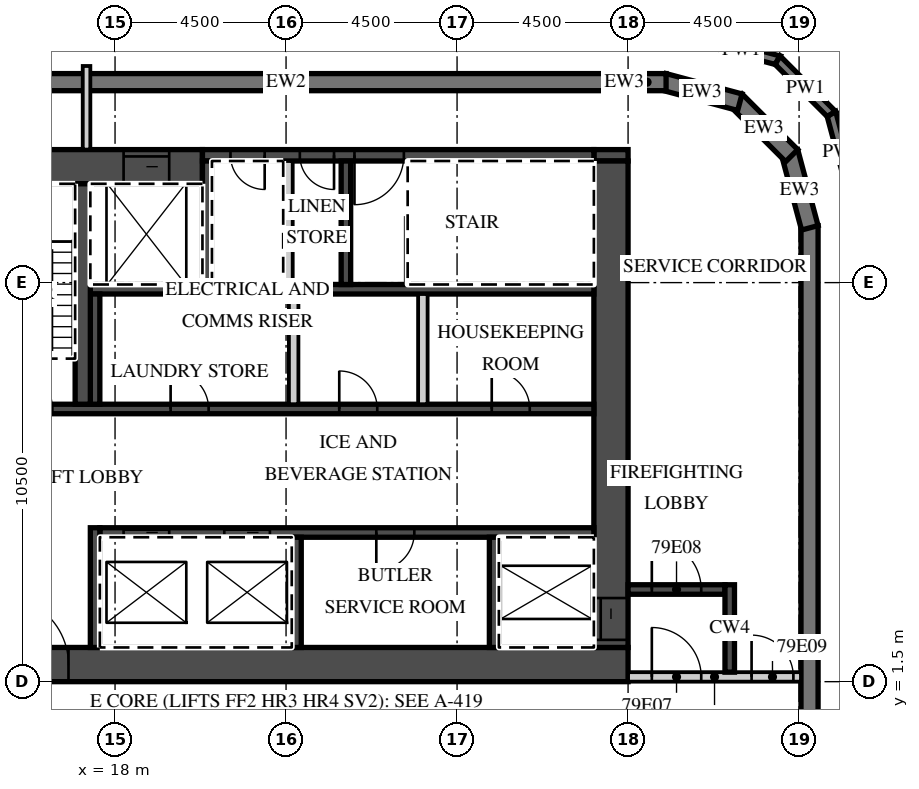
"""IFC4 building model, lengths in metres.
Left out: names, types, materials, properties, quantities, classifications, styles, units other than length and angle.
Written with IfcOpenShell. Run it as: python <this file> out.ifc"""

import sys

from ifc_helpers import new_model, si_unit, direction, frame, frame_2d, origin, place, context, subcontext, project, spatial, polyline, rectangle, outline, extrude, element, fill, save


model = new_model("IFC4")
c1 = context("Model", 3, precision=1e-05, world=origin(), true_north=direction((0.0, 1.0)))
c2 = subcontext(c1, "Body", "Model", "MODEL_VIEW")
j1 = project(units=[si_unit("LENGTHUNIT", "METRE"), si_unit("PLANEANGLEUNIT", "RADIAN")], contexts=[c1])
p1 = place(None, origin())
s1 = spatial("IfcSite", under=j1, at=p1, CompositionType="ELEMENT")
p2 = place(p1, origin())
s2 = spatial("IfcBuilding", under=s1, at=p2, CompositionType="ELEMENT")
p3 = place(p2, frame((0.0, 0.0, 313.6)))
s3 = spatial("IfcBuildingStorey", under=s2, at=p3, CompositionType="ELEMENT", Elevation=313.6)
p4 = place(p3, frame((36.275, -14.5, 0.0), z_axis=(0.0, 0.0, 1.0), x_axis=(0.0, 1.0, 0.0)))
e1 = element("IfcWall", 1, at=p4, inside=s3, PredefinedType="SOLIDWALL", context=c2, shape_type="SweptSolid", body=[
    extrude(rectangle(XDim=28.0, YDim=0.45, at=frame_2d((14.0, 0.0))), origin(), (0.0, 0.0, 1.0), 3.8),
])
p5 = place(p3, frame((36.283, 13.442, 0.0), z_axis=(0.0, 0.0, 1.0), x_axis=(-0.25881466832, 0.965926999034, 0.0)))
e2 = element("IfcWall", 2, at=p5, inside=s3, PredefinedType="SOLIDWALL", context=c2, shape_type="SweptSolid", body=[
    extrude(outline(polyline([(0.0, -0.225), (2.071, -0.225), (1.95, 0.225), (0.121, 0.225), (0.0, -0.225)])), origin(), (0.0, 0.0, 1.0), 3.8),
])
p6 = place(p3, frame((35.805, 15.341, 0.0), z_axis=(0.0, 0.0, 1.0), x_axis=(-0.707106781187, 0.707106781187, 0.0)))
e3 = element("IfcWall", 3, at=p6, inside=s3, PredefinedType="SOLIDWALL", context=c2, shape_type="SweptSolid", body=[
    extrude(outline(polyline([(0.0, -0.225), (2.071, -0.225), (1.95, 0.225), (0.121, 0.225), (0.0, -0.225)])), origin(), (0.0, 0.0, 1.0), 3.8),
])
p7 = place(p3, frame((34.442, 16.747, 0.0), z_axis=(0.0, 0.0, 1.0), x_axis=(-0.965926999034, 0.25881466832, 0.0)))
e4 = element("IfcWall", 4, at=p7, inside=s3, PredefinedType="SOLIDWALL", context=c2, shape_type="SweptSolid", body=[
    extrude(outline(polyline([(-0.0, -0.225), (2.07, -0.225), (1.95, 0.225), (0.12, 0.225), (-0.0, -0.225)])), origin(), (0.0, 0.0, 1.0), 3.8),
])
p8 = place(p3, frame((32.5, 17.275, 0.0), z_axis=(0.0, 0.0, 1.0), x_axis=(-1.0, 0.0, 0.0)))
e5 = element("IfcWall", 5, at=p8, inside=s3, PredefinedType="SOLIDWALL", context=c2, shape_type="SweptSolid", body=[
    extrude(rectangle(XDim=1.0, YDim=0.45, at=frame_2d((0.5, 0.0))), origin(), (0.0, 0.0, 1.0), 3.8),
])
p9 = place(p3, frame((31.5, 17.275, 0.0), z_axis=(0.0, 0.0, 1.0), x_axis=(-1.0, 0.0, 0.0)))
e6 = element("IfcWall", 6, at=p9, inside=s3, PredefinedType="SOLIDWALL", context=c2, shape_type="SweptSolid", body=[
    extrude(rectangle(XDim=18.0, YDim=0.45, at=frame_2d((9.0, 0.0))), origin(), (0.0, 0.0, 1.0), 3.8),
])
p10 = place(p3, origin())
e7 = element("IfcWall", 7, at=p10, inside=s3, PredefinedType="PARAPET", context=c2, shape_type="SweptSolid", body=[
    extrude(outline(polyline([(33.5, 18.5), (33.467, 18.25), (35.371, 17.74), (35.5, 17.964), (33.5, 18.5)])), origin(), (0.0, 0.0, 1.0), 1.1),
])
p11 = place(p3, origin())
e8 = element("IfcWall", 8, at=p11, inside=s3, PredefinedType="PARAPET", context=c2, shape_type="SweptSolid", body=[
    extrude(outline(polyline([(35.5, 17.964), (35.371, 17.74), (36.74, 16.371), (36.964, 16.5), (35.5, 17.964)])), origin(), (0.0, 0.0, 1.0), 1.1),
])
p12 = place(p3, origin())
e9 = element("IfcWall", 9, at=p12, inside=s3, PredefinedType="PARAPET", context=c2, shape_type="SweptSolid", body=[
    extrude(outline(polyline([(36.964, 16.5), (36.74, 16.371), (37.25, 14.467), (37.5, 14.5), (36.964, 16.5)])), origin(), (0.0, 0.0, 1.0), 1.1),
])
p13 = place(p3, frame((13.5, 1.95, 0.0), z_axis=(0.0, 0.0, 1.0), x_axis=(1.0, 0.0, 0.0)))
e10 = element("IfcWall", 10, at=p13, inside=s3, PredefinedType="SHEAR", context=c2, shape_type="SweptSolid", body=[
    extrude(rectangle(XDim=18.0, YDim=0.9, at=frame_2d((9.0, 0.0))), origin(), (0.0, 0.0, 1.0), 3.8),
])
p14 = place(p13, frame((1.475, 0.0, 0.0)))
e11 = element("IfcOpeningElement", 11, at=p14, cuts=e10, PredefinedType="OPENING", context=c2, shape_type="SweptSolid", body=[
    extrude(rectangle(XDim=1.8, YDim=2.1, at=frame_2d((0.9, 1.05))), frame((0.0, 0.46, 0.0), z_axis=(0.0, -1.0, 0.0), x_axis=(1.0, 0.0, 0.0)), (0.0, 0.0, 1.0), 0.92),
])
p15 = place(p3, frame((13.5, 15.05, 0.0), z_axis=(0.0, 0.0, 1.0), x_axis=(1.0, 0.0, 0.0)))
e12 = element("IfcWall", 12, at=p15, inside=s3, PredefinedType="SHEAR", context=c2, shape_type="SweptSolid", body=[
    extrude(rectangle(XDim=6.8, YDim=0.9, at=frame_2d((3.4, 0.0))), origin(), (0.0, 0.0, 1.0), 3.8),
])
p16 = place(p15, frame((4.725, 0.0, 0.0)))
e13 = element("IfcOpeningElement", 13, at=p16, cuts=e12, PredefinedType="OPENING", context=c2, shape_type="SweptSolid", body=[
    extrude(rectangle(XDim=1.2, YDim=2.1, at=frame_2d((0.6, 1.05))), frame((0.0, 0.46, 0.0), z_axis=(0.0, -1.0, 0.0), x_axis=(1.0, 0.0, 0.0)), (0.0, 0.0, 1.0), 0.92),
])
p17 = place(p3, frame((30.6, 15.35, 0.0), z_axis=(0.0, 0.0, 1.0), x_axis=(1.0, 0.0, 0.0)))
e14 = element("IfcWall", 14, at=p17, inside=s3, PredefinedType="SHEAR", context=c2, shape_type="SweptSolid", body=[
    extrude(rectangle(XDim=0.9, YDim=0.3, at=frame_2d((0.45, 0.0))), origin(), (0.0, 0.0, 1.0), 3.8),
])
p18 = place(p3, frame((20.3, 15.35, 0.0), z_axis=(0.0, 0.0, 1.0), x_axis=(1.0, 0.0, 0.0)))
e15 = element("IfcWall", 15, at=p18, inside=s3, PredefinedType="SHEAR", context=c2, shape_type="SweptSolid", body=[
    extrude(rectangle(XDim=10.3, YDim=0.3, at=frame_2d((5.15, 0.0))), origin(), (0.0, 0.0, 1.0), 3.8),
])
p19 = place(p18, frame((4.0, 0.0, 0.0)))
e16 = element("IfcOpeningElement", 16, at=p19, cuts=e15, PredefinedType="OPENING", context=c2, shape_type="SweptSolid", body=[
    extrude(rectangle(XDim=1.3, YDim=2.1, at=frame_2d((0.65, 1.05))), frame((0.0, 0.16, 0.0), z_axis=(0.0, -1.0, 0.0), x_axis=(1.0, 0.0, 0.0)), (0.0, 0.0, 1.0), 0.32),
])
p20 = place(p18, frame((2.562, 0.0, 0.0)))
e17 = element("IfcOpeningElement", 17, at=p20, cuts=e15, PredefinedType="OPENING", context=c2, shape_type="SweptSolid", body=[
    extrude(rectangle(XDim=0.9, YDim=2.1, at=frame_2d((0.45, 1.05))), frame((0.0, 0.16, 0.0), z_axis=(0.0, -1.0, 0.0), x_axis=(1.0, 0.0, 0.0)), (0.0, 0.0, 1.0), 0.32),
])
p21 = place(p18, frame((0.738, 0.0, 0.0)))
e18 = element("IfcOpeningElement", 18, at=p21, cuts=e15, PredefinedType="OPENING", context=c2, shape_type="SweptSolid", body=[
    extrude(rectangle(XDim=0.9, YDim=2.1, at=frame_2d((0.45, 1.05))), frame((0.0, 0.16, 0.0), z_axis=(0.0, -1.0, 0.0), x_axis=(1.0, 0.0, 0.0)), (0.0, 0.0, 1.0), 0.32),
])
p22 = place(p3, frame((31.05, 2.4, 0.0), z_axis=(0.0, 0.0, 1.0), x_axis=(0.0, 1.0, 0.0)))
e19 = element("IfcWall", 19, at=p22, inside=s3, PredefinedType="SHEAR", context=c2, shape_type="SweptSolid", body=[
    extrude(rectangle(XDim=12.8, YDim=0.9, at=frame_2d((6.4, 0.0))), origin(), (0.0, 0.0, 1.0), 3.8),
])
p23 = place(p22, frame((0.2, 0.0, 0.0)))
e20 = element("IfcOpeningElement", 20, at=p23, cuts=e19, PredefinedType="OPENING", context=c2, shape_type="SweptSolid", body=[
    extrude(rectangle(XDim=1.1, YDim=2.1, at=frame_2d((0.55, 1.05))), frame((0.0, 0.46, 0.0), z_axis=(0.0, -1.0, 0.0), x_axis=(1.0, 0.0, 0.0)), (0.0, 0.0, 1.0), 0.92),
])
p24 = place(p3, frame((17.6, 5.425, 0.0), z_axis=(0.0, 0.0, 1.0), x_axis=(1.0, 0.0, 0.0)))
e21 = element("IfcWall", 21, at=p24, inside=s3, PredefinedType="SHEAR", context=c2, shape_type="SweptSolid", body=[
    extrude(rectangle(XDim=13.0, YDim=0.25, at=frame_2d((6.5, 0.0))), origin(), (0.0, 0.0, 1.0), 3.8),
])
p25 = place(p24, frame((3.275, 0.0, 0.0)))
e22 = element("IfcOpeningElement", 22, at=p25, cuts=e21, PredefinedType="OPENING", context=c2, shape_type="SweptSolid", body=[
    extrude(rectangle(XDim=1.2, YDim=2.1, at=frame_2d((0.6, 1.05))), frame((0.0, 0.135, 0.0), z_axis=(0.0, -1.0, 0.0), x_axis=(1.0, 0.0, 0.0)), (0.0, 0.0, 1.0), 0.27),
])
p26 = place(p24, frame((0.625, 0.0, 0.0)))
e23 = element("IfcOpeningElement", 23, at=p26, cuts=e21, PredefinedType="OPENING", context=c2, shape_type="SweptSolid", body=[
    extrude(rectangle(XDim=1.2, YDim=2.1, at=frame_2d((0.6, 1.05))), frame((0.0, 0.135, 0.0), z_axis=(0.0, -1.0, 0.0), x_axis=(1.0, 0.0, 0.0)), (0.0, 0.0, 1.0), 0.27),
])
p27 = place(p24, frame((7.275, 0.0, 0.0)))
e24 = element("IfcOpeningElement", 24, at=p27, cuts=e21, PredefinedType="OPENING", context=c2, shape_type="SweptSolid", body=[
    extrude(rectangle(XDim=1.0, YDim=2.1, at=frame_2d((0.5, 1.05))), frame((0.0, 0.135, 0.0), z_axis=(0.0, -1.0, 0.0), x_axis=(1.0, 0.0, 0.0)), (0.0, 0.0, 1.0), 0.27),
])
p28 = place(p3, frame((17.475, 2.4, 0.0), z_axis=(0.0, 0.0, 1.0), x_axis=(0.0, 1.0, 0.0)))
e25 = element("IfcWall", 25, at=p28, inside=s3, PredefinedType="SHEAR", context=c2, shape_type="SweptSolid", body=[
    extrude(rectangle(XDim=3.15, YDim=0.25, at=frame_2d((1.575, 0.0))), origin(), (0.0, 0.0, 1.0), 3.8),
])
for number, where, z_axis, x_axis in (
    (26, (27.975, 2.4, 0.0), (0.0, 0.0, 1.0), (0.0, 1.0, 0.0)),
    (27, (22.775, 2.4, 0.0), (0.0, 0.0, 1.0), (0.0, 1.0, 0.0)),
):
    element("IfcWall", number, at=place(p3, frame(where, z_axis=z_axis, x_axis=x_axis)), inside=s3, PredefinedType="SHEAR", context=c2, shape_type="SweptSolid", body=[
        extrude(rectangle(XDim=2.9, YDim=0.25, at=frame_2d((1.45, 0.0))), origin(), (0.0, 0.0, 1.0), 3.8),
    ])
p29 = place(p3, frame((14.4, 8.675, 0.0), z_axis=(0.0, 0.0, 1.0), x_axis=(1.0, 0.0, 0.0)))
e28 = element("IfcWall", 28, at=p29, inside=s3, PredefinedType="SHEAR", context=c2, shape_type="SweptSolid", body=[
    extrude(rectangle(XDim=16.2, YDim=0.25, at=frame_2d((8.1, 0.0))), origin(), (0.0, 0.0, 1.0), 3.8),
])
p30 = place(p29, frame((0.65, 0.0, 0.0)))
e29 = element("IfcOpeningElement", 29, at=p30, cuts=e28, PredefinedType="OPENING", context=c2, shape_type="SweptSolid", body=[
    extrude(rectangle(XDim=1.3, YDim=2.1, at=frame_2d((0.65, 1.05))), frame((0.0, 0.135, 0.0), z_axis=(0.0, -1.0, 0.0), x_axis=(1.0, 0.0, 0.0)), (0.0, 0.0, 1.0), 0.27),
])
p31 = place(p29, frame((13.512, 0.0, 0.0)))
e30 = element("IfcOpeningElement", 30, at=p31, cuts=e28, PredefinedType="OPENING", context=c2, shape_type="SweptSolid", body=[
    extrude(rectangle(XDim=1.0, YDim=2.1, at=frame_2d((0.5, 1.05))), frame((0.0, 0.135, 0.0), z_axis=(0.0, -1.0, 0.0), x_axis=(1.0, 0.0, 0.0)), (0.0, 0.0, 1.0), 0.27),
])
p32 = place(p29, frame((9.5, 0.0, 0.0)))
e31 = element("IfcOpeningElement", 31, at=p32, cuts=e28, PredefinedType="OPENING", context=c2, shape_type="SweptSolid", body=[
    extrude(rectangle(XDim=1.0, YDim=2.1, at=frame_2d((0.5, 1.05))), frame((0.0, 0.135, 0.0), z_axis=(0.0, -1.0, 0.0), x_axis=(1.0, 0.0, 0.0)), (0.0, 0.0, 1.0), 0.27),
])
p33 = place(p29, frame((5.062, 0.0, 0.0)))
e32 = element("IfcOpeningElement", 32, at=p33, cuts=e28, PredefinedType="OPENING", context=c2, shape_type="SweptSolid", body=[
    extrude(rectangle(XDim=1.0, YDim=2.1, at=frame_2d((0.5, 1.05))), frame((0.0, 0.135, 0.0), z_axis=(0.0, -1.0, 0.0), x_axis=(1.0, 0.0, 0.0)), (0.0, 0.0, 1.0), 0.27),
])
p34 = place(p3, frame((17.35, 11.825, 0.0), z_axis=(0.0, 0.0, 1.0), x_axis=(1.0, 0.0, 0.0)))
e33 = element("IfcWall", 33, at=p34, inside=s3, PredefinedType="SHEAR", context=c2, shape_type="SweptSolid", body=[
    extrude(rectangle(XDim=13.25, YDim=0.25, at=frame_2d((6.625, 0.0))), origin(), (0.0, 0.0, 1.0), 3.8),
])
p35 = place(p3, frame((17.475, 8.8, 0.0), z_axis=(0.0, 0.0, 1.0), x_axis=(0.0, 1.0, 0.0)))
e34 = element("IfcWall", 34, at=p35, inside=s3, PredefinedType="SHEAR", context=c2, shape_type="SweptSolid", body=[
    extrude(rectangle(XDim=2.9, YDim=0.25, at=frame_2d((1.45, 0.0))), origin(), (0.0, 0.0, 1.0), 3.8),
])
for number, where, z_axis, x_axis in (
    (35, (26.1, 8.8, 0.0), (0.0, 0.0, 1.0), (0.0, 1.0, 0.0)),
    (36, (22.7, 8.8, 0.0), (0.0, 0.0, 1.0), (0.0, 1.0, 0.0)),
):
    element("IfcWall", number, at=place(p3, frame(where, z_axis=z_axis, x_axis=x_axis)), inside=s3, PredefinedType="PARTITIONING", context=c2, shape_type="SweptSolid", body=[
        extrude(rectangle(XDim=2.9, YDim=0.25, at=frame_2d((1.45, 0.0))), origin(), (0.0, 0.0, 1.0), 3.8),
    ])
p36 = place(p3, frame((17.15, 8.8, 0.0), z_axis=(0.0, 0.0, 1.0), x_axis=(0.0, 1.0, 0.0)))
e37 = element("IfcWall", 37, at=p36, inside=s3, PredefinedType="SHEAR", context=c2, shape_type="SweptSolid", body=[
    extrude(rectangle(XDim=5.8, YDim=0.4, at=frame_2d((2.9, 0.0))), origin(), (0.0, 0.0, 1.0), 3.8),
])
for number, where, z_axis, x_axis in (
    (38, (20.425, 11.95, 0.0), (0.0, 0.0, 1.0), (0.0, 1.0, 0.0)),
    (39, (24.075, 11.95, 0.0), (0.0, 0.0, 1.0), (0.0, 1.0, 0.0)),
):
    element("IfcWall", number, at=place(p3, frame(where, z_axis=z_axis, x_axis=x_axis)), inside=s3, PredefinedType="SHEAR", context=c2, shape_type="SweptSolid", body=[
        extrude(rectangle(XDim=3.25, YDim=0.25, at=frame_2d((1.625, 0.0))), origin(), (0.0, 0.0, 1.0), 3.8),
    ])
p37 = place(p3, frame((22.55, 11.95, 0.0), z_axis=(0.0, 0.0, 1.0), x_axis=(0.0, 1.0, 0.0)))
e40 = element("IfcWall", 40, at=p37, inside=s3, PredefinedType="PARTITIONING", context=c2, shape_type="SweptSolid", body=[
    extrude(rectangle(XDim=3.25, YDim=0.25, at=frame_2d((1.625, 0.0))), origin(), (0.0, 0.0, 1.0), 3.8),
])
p38 = place(p3, frame((31.5, 1.625, 0.0), z_axis=(0.0, 0.0, 1.0), x_axis=(1.0, 0.0, 0.0)))
e41 = element("IfcWall", 41, at=p38, inside=s3, PredefinedType="PARTITIONING", context=c2, shape_type="SweptSolid", body=[
    extrude(rectangle(XDim=4.55, YDim=0.25, at=frame_2d((2.275, 0.0))), origin(), (0.0, 0.0, 1.0), 3.8),
])
p39 = place(p38, frame((0.625, 0.0, 0.0)))
e42 = element("IfcOpeningElement", 42, at=p39, cuts=e41, PredefinedType="OPENING", context=c2, shape_type="SweptSolid", body=[
    extrude(rectangle(XDim=1.3, YDim=2.1, at=frame_2d((0.65, 1.05))), frame((0.0, 0.135, 0.0), z_axis=(0.0, -1.0, 0.0), x_axis=(1.0, 0.0, 0.0)), (0.0, 0.0, 1.0), 0.27),
])
p40 = place(p38, frame((3.25, 0.0, 0.0)))
e43 = element("IfcOpeningElement", 43, at=p40, cuts=e41, PredefinedType="OPENING", context=c2, shape_type="SweptSolid", body=[
    extrude(rectangle(XDim=1.1, YDim=2.1, at=frame_2d((0.55, 1.05))), frame((0.0, 0.135, 0.0), z_axis=(0.0, -1.0, 0.0), x_axis=(1.0, 0.0, 0.0)), (0.0, 0.0, 1.0), 0.27),
])
p41 = place(p3, frame((31.5, 3.925, 0.0), z_axis=(0.0, 0.0, 1.0), x_axis=(1.0, 0.0, 0.0)))
e44 = element("IfcWall", 44, at=p41, inside=s3, PredefinedType="SHEAR", context=c2, shape_type="SweptSolid", body=[
    extrude(rectangle(XDim=2.55, YDim=0.25, at=frame_2d((1.275, 0.0))), origin(), (0.0, 0.0, 1.0), 3.8),
])
p42 = place(p41, frame((0.625, 0.0, 0.0)))
e45 = element("IfcOpeningElement", 45, at=p42, cuts=e44, PredefinedType="OPENING", context=c2, shape_type="SweptSolid", body=[
    extrude(rectangle(XDim=1.3, YDim=2.1, at=frame_2d((0.65, 1.05))), frame((0.0, 0.135, 0.0), z_axis=(0.0, -1.0, 0.0), x_axis=(1.0, 0.0, 0.0)), (0.0, 0.0, 1.0), 0.27),
])
p43 = place(p3, frame((34.175, 1.75, 0.0), z_axis=(0.0, 0.0, 1.0), x_axis=(0.0, 1.0, 0.0)))
e46 = element("IfcWall", 46, at=p43, inside=s3, PredefinedType="SHEAR", context=c2, shape_type="SweptSolid", body=[
    extrude(rectangle(XDim=2.3, YDim=0.25, at=frame_2d((1.15, 0.0))), origin(), (0.0, 0.0, 1.0), 3.8),
])
p44 = place(p3, frame((17.25, 15.5, 0.0), z_axis=(0.0, 0.0, 1.0), x_axis=(0.0, 1.0, 0.0)))
e47 = element("IfcWall", 47, at=p44, inside=s3, PredefinedType="PARTITIONING", context=c2, shape_type="SweptSolid", body=[
    extrude(rectangle(XDim=2.2, YDim=0.2, at=frame_2d((1.1, 0.0))), origin(), (0.0, 0.0, 1.0), 3.8),
])
p45 = place(p25, origin())
e48 = element("IfcDoor", 48, at=p45, inside=s3, OperationType="SLIDING_TO_RIGHT", PredefinedType="DOOR", context=c2, shape_type="SweptSolid", body=[
    extrude(rectangle(XDim=1.2, YDim=2.1, at=frame_2d((0.6, 1.05))), frame((0.0, 0.025, 0.0), z_axis=(0.0, -1.0, 0.0), x_axis=(1.0, 0.0, 0.0)), (0.0, 0.0, 1.0), 0.05),
])
fill(e22, e48)
p46 = place(p26, origin())
e49 = element("IfcDoor", 49, at=p46, inside=s3, OperationType="SLIDING_TO_LEFT", PredefinedType="DOOR", context=c2, shape_type="SweptSolid", body=[
    extrude(rectangle(XDim=1.2, YDim=2.1, at=frame_2d((0.6, 1.05))), frame((0.0, 0.025, 0.0), z_axis=(0.0, -1.0, 0.0), x_axis=(1.0, 0.0, 0.0)), (0.0, 0.0, 1.0), 0.05),
])
fill(e23, e49)
p47 = place(p16, origin())
e50 = element("IfcDoor", 50, at=p47, inside=s3, OperationType="SLIDING_TO_LEFT", PredefinedType="DOOR", context=c2, shape_type="SweptSolid", body=[
    extrude(rectangle(XDim=1.2, YDim=2.1, at=frame_2d((0.6, 1.05))), frame((0.0, 0.025, 0.0), z_axis=(0.0, -1.0, 0.0), x_axis=(1.0, 0.0, 0.0)), (0.0, 0.0, 1.0), 0.05),
])
fill(e13, e50)
p48 = place(p23, origin())
e51 = element("IfcDoor", 51, at=p48, inside=s3, OperationType="SLIDING_TO_LEFT", PredefinedType="DOOR", context=c2, shape_type="SweptSolid", body=[
    extrude(rectangle(XDim=1.1, YDim=2.1, at=frame_2d((0.55, 1.05))), frame((0.0, 0.025, 0.0), z_axis=(0.0, -1.0, 0.0), x_axis=(1.0, 0.0, 0.0)), (0.0, 0.0, 1.0), 0.05),
])
fill(e20, e51)
p49 = place(p14, origin())
e52 = element("IfcDoor", 52, at=p49, inside=s3, OperationType="DOUBLE_DOOR_DOUBLE_SWING", PredefinedType="DOOR", context=c2, shape_type="SweptSolid", body=[
    extrude(rectangle(XDim=1.8, YDim=2.1, at=frame_2d((0.9, 1.05))), frame((0.0, 0.025, 0.0), z_axis=(0.0, -1.0, 0.0), x_axis=(1.0, 0.0, 0.0)), (0.0, 0.0, 1.0), 0.05),
])
fill(e11, e52)
p50 = place(p39, origin())
e53 = element("IfcDoor", 53, at=p50, inside=s3, OperationType="SINGLE_SWING_LEFT", PredefinedType="DOOR", context=c2, shape_type="SweptSolid", body=[
    extrude(rectangle(XDim=1.3, YDim=2.1, at=frame_2d((0.65, 1.05))), frame((0.0, 0.025, 0.0), z_axis=(0.0, -1.0, 0.0), x_axis=(1.0, 0.0, 0.0)), (0.0, 0.0, 1.0), 0.05),
])
fill(e42, e53)
p51 = place(p42, origin())
e54 = element("IfcDoor", 54, at=p51, inside=s3, OperationType="SINGLE_SWING_LEFT", PredefinedType="DOOR", context=c2, shape_type="SweptSolid", body=[
    extrude(rectangle(XDim=1.3, YDim=2.1, at=frame_2d((0.65, 1.05))), frame((0.0, 0.025, 0.0), z_axis=(0.0, -1.0, 0.0), x_axis=(1.0, 0.0, 0.0)), (0.0, 0.0, 1.0), 0.05),
])
fill(e45, e54)
p52 = place(p40, origin())
e55 = element("IfcDoor", 55, at=p52, inside=s3, OperationType="SINGLE_SWING_LEFT", PredefinedType="DOOR", context=c2, shape_type="SweptSolid", body=[
    extrude(rectangle(XDim=1.1, YDim=2.1, at=frame_2d((0.55, 1.05))), frame((0.0, 0.025, 0.0), z_axis=(0.0, -1.0, 0.0), x_axis=(1.0, 0.0, 0.0)), (0.0, 0.0, 1.0), 0.05),
])
fill(e43, e55)
p53 = place(p19, origin())
e56 = element("IfcDoor", 56, at=p53, inside=s3, OperationType="SINGLE_SWING_LEFT", PredefinedType="DOOR", context=c2, shape_type="SweptSolid", body=[
    extrude(rectangle(XDim=1.3, YDim=2.1, at=frame_2d((0.65, 1.05))), frame((0.0, 0.025, 0.0), z_axis=(0.0, -1.0, 0.0), x_axis=(1.0, 0.0, 0.0)), (0.0, 0.0, 1.0), 0.05),
])
fill(e16, e56)
p54 = place(p20, origin())
e57 = element("IfcDoor", 57, at=p54, inside=s3, OperationType="SINGLE_SWING_RIGHT", PredefinedType="DOOR", context=c2, shape_type="SweptSolid", body=[
    extrude(rectangle(XDim=0.9, YDim=2.1, at=frame_2d((0.45, 1.05))), frame((0.0, 0.025, 0.0), z_axis=(0.0, -1.0, 0.0), x_axis=(1.0, 0.0, 0.0)), (0.0, 0.0, 1.0), 0.05),
])
fill(e17, e57)
p55 = place(p21, origin())
e58 = element("IfcDoor", 58, at=p55, inside=s3, OperationType="SINGLE_SWING_RIGHT", PredefinedType="DOOR", context=c2, shape_type="SweptSolid", body=[
    extrude(rectangle(XDim=0.9, YDim=2.1, at=frame_2d((0.45, 1.05))), frame((0.0, 0.025, 0.0), z_axis=(0.0, -1.0, 0.0), x_axis=(1.0, 0.0, 0.0)), (0.0, 0.0, 1.0), 0.05),
])
fill(e18, e58)
p56 = place(p31, origin())
e59 = element("IfcDoor", 59, at=p56, inside=s3, OperationType="SINGLE_SWING_LEFT", PredefinedType="DOOR", context=c2, shape_type="SweptSolid", body=[
    extrude(rectangle(XDim=1.0, YDim=2.1, at=frame_2d((0.5, 1.05))), frame((0.0, 0.025, 0.0), z_axis=(0.0, -1.0, 0.0), x_axis=(1.0, 0.0, 0.0)), (0.0, 0.0, 1.0), 0.05),
])
fill(e30, e59)
p57 = place(p32, origin())
e60 = element("IfcDoor", 60, at=p57, inside=s3, OperationType="SINGLE_SWING_LEFT", PredefinedType="DOOR", context=c2, shape_type="SweptSolid", body=[
    extrude(rectangle(XDim=1.0, YDim=2.1, at=frame_2d((0.5, 1.05))), frame((0.0, 0.025, 0.0), z_axis=(0.0, -1.0, 0.0), x_axis=(1.0, 0.0, 0.0)), (0.0, 0.0, 1.0), 0.05),
])
fill(e31, e60)
p58 = place(p33, origin())
e61 = element("IfcDoor", 61, at=p58, inside=s3, OperationType="SINGLE_SWING_LEFT", PredefinedType="DOOR", context=c2, shape_type="SweptSolid", body=[
    extrude(rectangle(XDim=1.0, YDim=2.1, at=frame_2d((0.5, 1.05))), frame((0.0, 0.025, 0.0), z_axis=(0.0, -1.0, 0.0), x_axis=(1.0, 0.0, 0.0)), (0.0, 0.0, 1.0), 0.05),
])
fill(e32, e61)
p59 = place(p27, origin())
e62 = element("IfcDoor", 62, at=p59, inside=s3, OperationType="SINGLE_SWING_LEFT", PredefinedType="DOOR", context=c2, shape_type="SweptSolid", body=[
    extrude(rectangle(XDim=1.0, YDim=2.1, at=frame_2d((0.5, 1.05))), frame((0.0, 0.025, 0.0), z_axis=(0.0, -1.0, 0.0), x_axis=(1.0, 0.0, 0.0)), (0.0, 0.0, 1.0), 0.05),
])
fill(e24, e62)
save(model, sys.argv[1])
